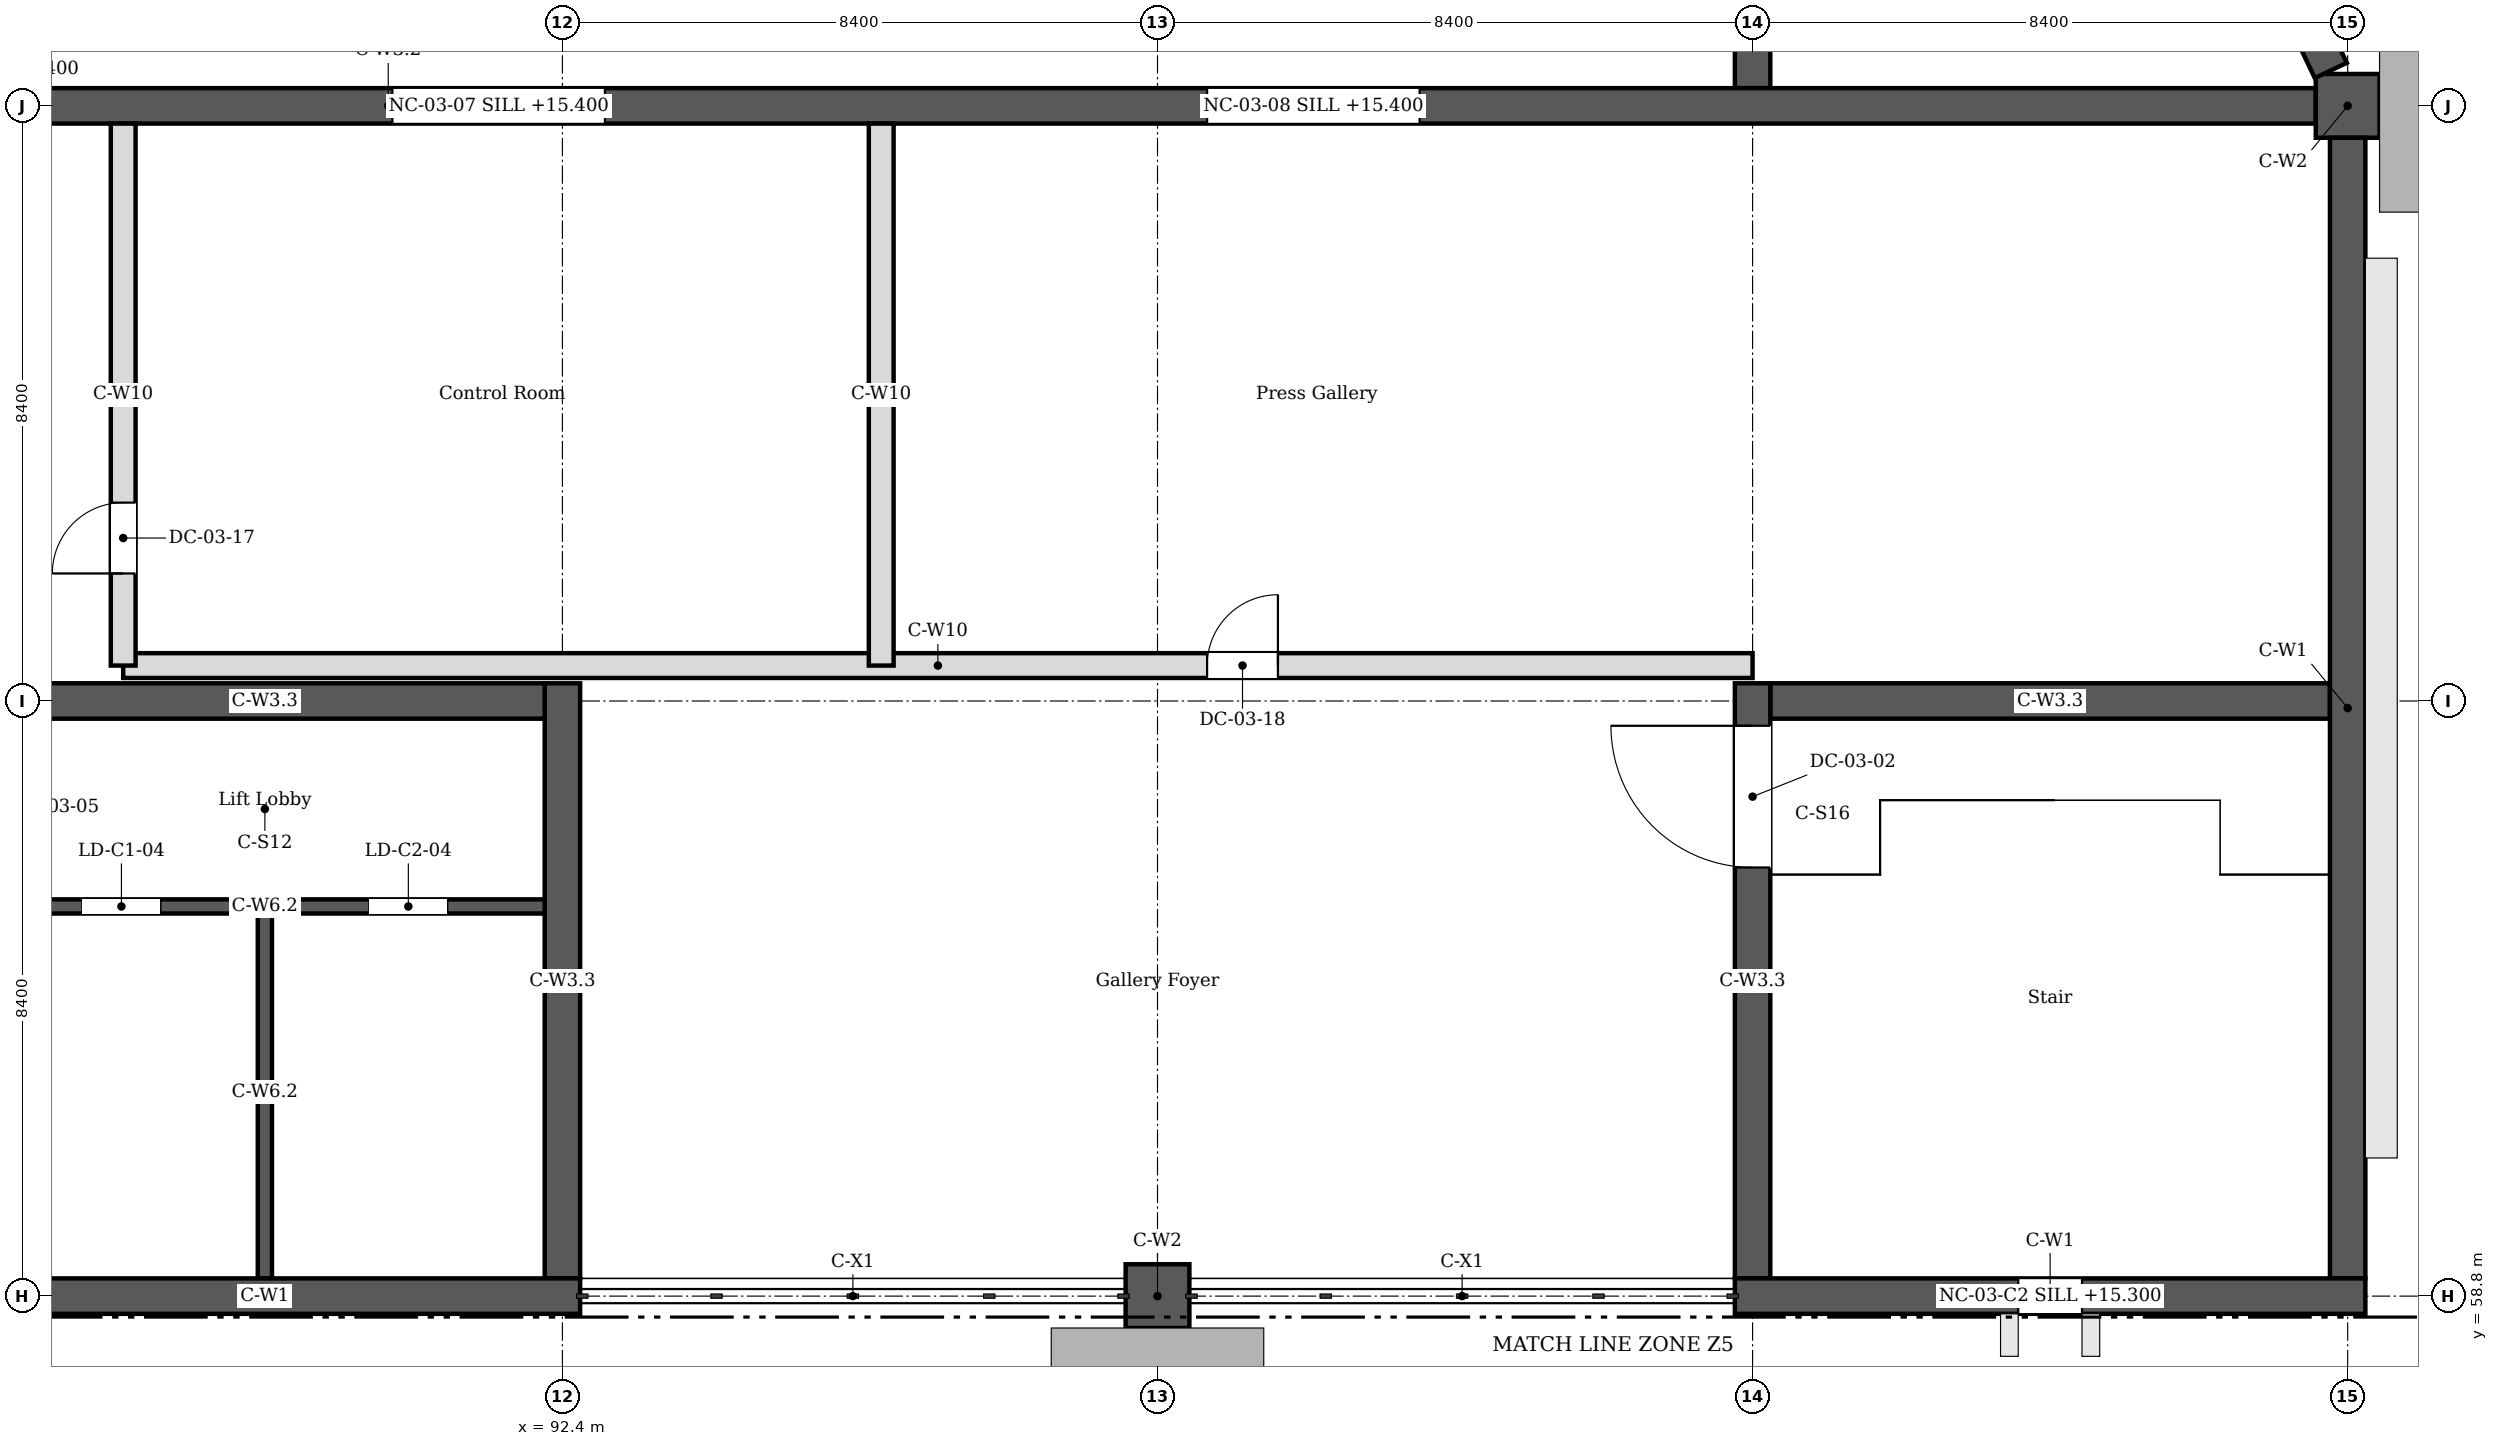
"""IFC4 building model, lengths in metres.
Left out: names, types, materials, properties, quantities, classifications, styles, units other than length and angle.
Written with IfcOpenShell. Run it as: python <this file> out.ifc"""

import sys

from ifc_helpers import new_model, si_unit, direction, frame, frame_2d, origin, place, context, subcontext, project, spatial, rectangle, extrude, element, fill, save


model = new_model("IFC4")
c1 = context("Model", 3, precision=1e-05, world=origin(), true_north=direction((0.0, 1.0)))
c2 = subcontext(c1, "Body", "Model", "MODEL_VIEW")
j1 = project(units=[si_unit("LENGTHUNIT", "METRE"), si_unit("PLANEANGLEUNIT", "RADIAN")], contexts=[c1])
p1 = place(None, origin())
s1 = spatial("IfcSite", under=j1, at=p1, CompositionType="ELEMENT")
p2 = place(p1, origin())
s2 = spatial("IfcBuilding", under=s1, at=p2, CompositionType="ELEMENT")
p3 = place(p2, frame((0.0, 0.0, 14.4)))
s3 = spatial("IfcBuildingStorey", under=s2, at=p3, CompositionType="ELEMENT", Elevation=14.4)
p4 = place(p3, frame((92.65, 58.8, 0.0), z_axis=(0.0, 0.0, 1.0), x_axis=(-1.0, 0.0, 0.0)))
e1 = element("IfcWall", 1, at=p4, inside=s3, PredefinedType="SOLIDWALL", context=c2, shape_type="SweptSolid", body=[
    extrude(rectangle(XDim=8.9, YDim=0.5, at=frame_2d((4.45, 0.0))), origin(), (0.0, 0.0, 1.0), 4.2),
])
p5 = place(p3, frame((117.85, 58.8, 0.0), z_axis=(0.0, 0.0, 1.0), x_axis=(-1.0, 0.0, 0.0)))
e2 = element("IfcWall", 2, at=p5, inside=s3, PredefinedType="SOLIDWALL", context=c2, shape_type="SweptSolid", body=[
    extrude(rectangle(XDim=8.9, YDim=0.5, at=frame_2d((4.45, 0.0))), origin(), (0.0, 0.0, 1.0), 4.2),
])
p6 = place(p5, frame((4.0, 0.0, 0.9)))
e3 = element("IfcOpeningElement", 3, at=p6, cuts=e2, PredefinedType="OPENING", context=c2, shape_type="SweptSolid", body=[
    extrude(rectangle(XDim=0.9, YDim=2.4, at=frame_2d((0.45, 1.2))), frame((0.0, 0.26, 0.0), z_axis=(0.0, -1.0, 0.0), x_axis=(1.0, 0.0, 0.0)), (0.0, 0.0, 1.0), 0.52),
])
p7 = place(p3, frame((100.35, 58.8, 0.0), z_axis=(0.0, 0.0, 1.0), x_axis=(1.0, 0.0, 0.0)))
e4 = element("IfcWall", 4, at=p7, inside=s3, PredefinedType="SOLIDWALL", context=c2, shape_type="SweptSolid", body=[
    extrude(rectangle(XDim=0.9, YDim=0.9, at=frame_2d((0.45, 0.0))), origin(), (0.0, 0.0, 1.0), 4.2),
])
p8 = place(p3, frame((117.6, 75.15, 0.0), z_axis=(0.0, 0.0, 1.0), x_axis=(0.0, -1.0, 0.0)))
e5 = element("IfcWall", 5, at=p8, inside=s3, PredefinedType="SOLIDWALL", context=c2, shape_type="SweptSolid", body=[
    extrude(rectangle(XDim=16.1, YDim=0.5, at=frame_2d((8.05, 0.0))), origin(), (0.0, 0.0, 1.0), 4.2),
])
p9 = place(p3, frame((113.666, 83.863, 0.0), z_axis=(0.0, 0.0, 1.0), x_axis=(0.429922557701, -0.902865767642, 0.0)))
e6 = element("IfcWall", 6, at=p9, inside=s3, PredefinedType="SOLIDWALL", context=c2, shape_type="SweptSolid", body=[
    extrude(rectangle(XDim=8.598, YDim=0.5, at=frame_2d((4.299, 0.0))), origin(), (0.0, 0.0, 1.0), 4.2),
])
p10 = place(p9, frame((5.012, 0.0, 0.3)))
e7 = element("IfcOpeningElement", 7, at=p10, cuts=e6, PredefinedType="OPENING", context=c2, shape_type="SweptSolid", body=[
    extrude(rectangle(XDim=1.8, YDim=3.6, at=frame_2d((0.9, 1.8))), frame((0.0, 0.26, 0.0), z_axis=(0.0, -1.0, 0.0), x_axis=(1.0, 0.0, 0.0)), (0.0, 0.0, 1.0), 0.52),
])
p11 = place(p9, frame((2.188, 0.0, 0.3)))
e8 = element("IfcOpeningElement", 8, at=p11, cuts=e6, PredefinedType="OPENING", context=c2, shape_type="SweptSolid", body=[
    extrude(rectangle(XDim=1.8, YDim=3.6, at=frame_2d((0.9, 1.8))), frame((0.0, 0.26, 0.0), z_axis=(0.0, -1.0, 0.0), x_axis=(1.0, 0.0, 0.0)), (0.0, 0.0, 1.0), 0.52),
])
p12 = place(p3, frame((117.6, 75.15, 0.0), z_axis=(0.0, 0.0, 1.0), x_axis=(0.0, 1.0, 0.0)))
e9 = element("IfcWall", 9, at=p12, inside=s3, PredefinedType="SOLIDWALL", context=c2, shape_type="SweptSolid", body=[
    extrude(rectangle(XDim=0.9, YDim=0.9, at=frame_2d((0.45, 0.0))), origin(), (0.0, 0.0, 1.0), 4.2),
])
p13 = place(p3, frame((59.25, 75.6, 0.0), z_axis=(0.0, 0.0, 1.0), x_axis=(1.0, 0.0, 0.0)))
e10 = element("IfcWall", 10, at=p13, inside=s3, PredefinedType="SOLIDWALL", context=c2, shape_type="SweptSolid", body=[
    extrude(rectangle(XDim=57.9, YDim=0.5, at=frame_2d((28.95, 0.0))), origin(), (0.0, 0.0, 1.0), 4.2),
])
p14 = place(p13, frame((10.75, 0.0, 1.0)))
e11 = element("IfcOpeningElement", 11, at=p14, cuts=e10, PredefinedType="OPENING", context=c2, shape_type="SweptSolid", body=[
    extrude(rectangle(XDim=1.6, YDim=1.2, at=frame_2d((0.8, 0.6))), frame((0.0, 0.26, 0.0), z_axis=(0.0, -1.0, 0.0), x_axis=(1.0, 0.0, 0.0)), (0.0, 0.0, 1.0), 0.52),
])
p15 = place(p13, frame((13.15, 0.0, 1.0)))
e12 = element("IfcOpeningElement", 12, at=p15, cuts=e10, PredefinedType="OPENING", context=c2, shape_type="SweptSolid", body=[
    extrude(rectangle(XDim=1.6, YDim=1.2, at=frame_2d((0.8, 0.6))), frame((0.0, 0.26, 0.0), z_axis=(0.0, -1.0, 0.0), x_axis=(1.0, 0.0, 0.0)), (0.0, 0.0, 1.0), 0.52),
])
p16 = place(p13, frame((15.55, 0.0, 1.0)))
e13 = element("IfcOpeningElement", 13, at=p16, cuts=e10, PredefinedType="OPENING", context=c2, shape_type="SweptSolid", body=[
    extrude(rectangle(XDim=1.6, YDim=1.2, at=frame_2d((0.8, 0.6))), frame((0.0, 0.26, 0.0), z_axis=(0.0, -1.0, 0.0), x_axis=(1.0, 0.0, 0.0)), (0.0, 0.0, 1.0), 0.52),
])
p17 = place(p13, frame((17.95, 0.0, 1.0)))
e14 = element("IfcOpeningElement", 14, at=p17, cuts=e10, PredefinedType="OPENING", context=c2, shape_type="SweptSolid", body=[
    extrude(rectangle(XDim=1.6, YDim=1.2, at=frame_2d((0.8, 0.6))), frame((0.0, 0.26, 0.0), z_axis=(0.0, -1.0, 0.0), x_axis=(1.0, 0.0, 0.0)), (0.0, 0.0, 1.0), 0.52),
])
p18 = place(p13, frame((20.35, 0.0, 1.0)))
e15 = element("IfcOpeningElement", 15, at=p18, cuts=e10, PredefinedType="OPENING", context=c2, shape_type="SweptSolid", body=[
    extrude(rectangle(XDim=1.6, YDim=1.2, at=frame_2d((0.8, 0.6))), frame((0.0, 0.26, 0.0), z_axis=(0.0, -1.0, 0.0), x_axis=(1.0, 0.0, 0.0)), (0.0, 0.0, 1.0), 0.52),
])
p19 = place(p13, frame((22.75, 0.0, 1.0)))
e16 = element("IfcOpeningElement", 16, at=p19, cuts=e10, PredefinedType="OPENING", context=c2, shape_type="SweptSolid", body=[
    extrude(rectangle(XDim=1.6, YDim=1.2, at=frame_2d((0.8, 0.6))), frame((0.0, 0.26, 0.0), z_axis=(0.0, -1.0, 0.0), x_axis=(1.0, 0.0, 0.0)), (0.0, 0.0, 1.0), 0.52),
])
p20 = place(p13, frame((30.75, 0.0, 1.0)))
e17 = element("IfcOpeningElement", 17, at=p20, cuts=e10, PredefinedType="OPENING", context=c2, shape_type="SweptSolid", body=[
    extrude(rectangle(XDim=3.0, YDim=1.2, at=frame_2d((1.5, 0.6))), frame((0.0, 0.26, 0.0), z_axis=(0.0, -1.0, 0.0), x_axis=(1.0, 0.0, 0.0)), (0.0, 0.0, 1.0), 0.52),
])
p21 = place(p13, frame((42.25, 0.0, 1.0)))
e18 = element("IfcOpeningElement", 18, at=p21, cuts=e10, PredefinedType="OPENING", context=c2, shape_type="SweptSolid", body=[
    extrude(rectangle(XDim=3.0, YDim=1.2, at=frame_2d((1.5, 0.6))), frame((0.0, 0.26, 0.0), z_axis=(0.0, -1.0, 0.0), x_axis=(1.0, 0.0, 0.0)), (0.0, 0.0, 1.0), 0.52),
])
p22 = place(p3, frame((109.2, 117.35, 0.0), z_axis=(0.0, 0.0, 1.0), x_axis=(0.0, -1.0, 0.0)))
e19 = element("IfcWall", 19, at=p22, inside=s3, PredefinedType="SOLIDWALL", context=c2, shape_type="SweptSolid", body=[
    extrude(rectangle(XDim=41.5, YDim=0.5, at=frame_2d((20.75, 0.0))), origin(), (0.0, 0.0, 1.0), 4.2),
])
p23 = place(p22, frame((5.8, 0.0, 0.0)))
e20 = element("IfcOpeningElement", 20, at=p23, cuts=e19, PredefinedType="OPENING", context=c2, shape_type="SweptSolid", body=[
    extrude(rectangle(XDim=2.0, YDim=2.1, at=frame_2d((1.0, 1.05))), frame((0.0, 0.26, 0.0), z_axis=(0.0, -1.0, 0.0), x_axis=(1.0, 0.0, 0.0)), (0.0, 0.0, 1.0), 0.52),
])
p24 = place(p3, frame((109.2, 59.05, 0.0), z_axis=(0.0, 0.0, 1.0), x_axis=(0.0, 1.0, 0.0)))
e21 = element("IfcWall", 21, at=p24, inside=s3, PredefinedType="SOLIDWALL", context=c2, shape_type="SweptSolid", body=[
    extrude(rectangle(XDim=8.4, YDim=0.5, at=frame_2d((4.2, 0.0))), origin(), (0.0, 0.0, 1.0), 3.8),
])
p25 = place(p24, frame((5.8, 0.0, 0.0)))
e22 = element("IfcOpeningElement", 22, at=p25, cuts=e21, PredefinedType="OPENING", context=c2, shape_type="SweptSolid", body=[
    extrude(rectangle(XDim=2.0, YDim=2.1, at=frame_2d((1.0, 1.05))), frame((0.0, 0.26, 0.0), z_axis=(0.0, -1.0, 0.0), x_axis=(1.0, 0.0, 0.0)), (0.0, 0.0, 1.0), 0.52),
])
p26 = place(p3, frame((109.45, 67.2, 0.0), z_axis=(0.0, 0.0, 1.0), x_axis=(1.0, 0.0, 0.0)))
e23 = element("IfcWall", 23, at=p26, inside=s3, PredefinedType="SOLIDWALL", context=c2, shape_type="SweptSolid", body=[
    extrude(rectangle(XDim=7.9, YDim=0.5, at=frame_2d((3.95, 0.0))), origin(), (0.0, 0.0, 1.0), 3.8),
])
p27 = place(p3, frame((92.4, 59.05, 0.0), z_axis=(0.0, 0.0, 1.0), x_axis=(0.0, 1.0, 0.0)))
e24 = element("IfcWall", 24, at=p27, inside=s3, PredefinedType="SOLIDWALL", context=c2, shape_type="SweptSolid", body=[
    extrude(rectangle(XDim=8.4, YDim=0.5, at=frame_2d((4.2, 0.0))), origin(), (0.0, 0.0, 1.0), 3.8),
])
p28 = place(p3, frame((84.25, 67.2, 0.0), z_axis=(0.0, 0.0, 1.0), x_axis=(1.0, 0.0, 0.0)))
e25 = element("IfcWall", 25, at=p28, inside=s3, PredefinedType="SOLIDWALL", context=c2, shape_type="SweptSolid", body=[
    extrude(rectangle(XDim=7.9, YDim=0.5, at=frame_2d((3.95, 0.0))), origin(), (0.0, 0.0, 1.0), 3.8),
])
p29 = place(p3, frame((88.2, 59.05, 0.0), z_axis=(0.0, 0.0, 1.0), x_axis=(0.0, 1.0, 0.0)))
e26 = element("IfcWall", 26, at=p29, inside=s3, PredefinedType="PARTITIONING", context=c2, shape_type="SweptSolid", body=[
    extrude(rectangle(XDim=5.25, YDim=0.2, at=frame_2d((2.625, 0.0))), origin(), (0.0, 0.0, 1.0), 3.8),
])
p30 = place(p3, frame((84.25, 64.3, 0.0), z_axis=(0.0, 0.0, 1.0), x_axis=(1.0, 0.0, 0.0)))
e27 = element("IfcWall", 27, at=p30, inside=s3, PredefinedType="PARTITIONING", context=c2, shape_type="SweptSolid", body=[
    extrude(rectangle(XDim=7.9, YDim=0.2, at=frame_2d((3.95, 0.0))), origin(), (0.0, 0.0, 1.0), 3.8),
])
p31 = place(p30, frame((1.375, 0.0, 0.0)))
e28 = element("IfcOpeningElement", 28, at=p31, cuts=e27, PredefinedType="OPENING", context=c2, shape_type="SweptSolid", body=[
    extrude(rectangle(XDim=1.1, YDim=2.1, at=frame_2d((0.55, 1.05))), frame((0.0, 0.11, 0.0), z_axis=(0.0, -1.0, 0.0), x_axis=(1.0, 0.0, 0.0)), (0.0, 0.0, 1.0), 0.22),
])
p32 = place(p30, frame((5.425, 0.0, 0.0)))
e29 = element("IfcOpeningElement", 29, at=p32, cuts=e27, PredefinedType="OPENING", context=c2, shape_type="SweptSolid", body=[
    extrude(rectangle(XDim=1.1, YDim=2.1, at=frame_2d((0.55, 1.05))), frame((0.0, 0.11, 0.0), z_axis=(0.0, -1.0, 0.0), x_axis=(1.0, 0.0, 0.0)), (0.0, 0.0, 1.0), 0.22),
])
p33 = place(p3, frame((86.2, 67.7, 0.0), z_axis=(0.0, 0.0, 1.0), x_axis=(0.0, 1.0, 0.0)))
e30 = element("IfcWall", 30, at=p33, inside=s3, PredefinedType="PARTITIONING", context=c2, shape_type="SweptSolid", body=[
    extrude(rectangle(XDim=7.65, YDim=0.35, at=frame_2d((3.825, 0.0))), origin(), (0.0, 0.0, 1.0), 2.85),
])
p34 = place(p33, frame((1.3, 0.0, 0.0)))
e31 = element("IfcOpeningElement", 31, at=p34, cuts=e30, PredefinedType="OPENING", context=c2, shape_type="SweptSolid", body=[
    extrude(rectangle(XDim=1.0, YDim=2.1, at=frame_2d((0.5, 1.05))), frame((0.0, 0.185, 0.0), z_axis=(0.0, -1.0, 0.0), x_axis=(1.0, 0.0, 0.0)), (0.0, 0.0, 1.0), 0.37),
])
p35 = place(p3, frame((96.9, 67.7, 0.0), z_axis=(0.0, 0.0, 1.0), x_axis=(0.0, 1.0, 0.0)))
e32 = element("IfcWall", 32, at=p35, inside=s3, PredefinedType="PARTITIONING", context=c2, shape_type="SweptSolid", body=[
    extrude(rectangle(XDim=7.65, YDim=0.35, at=frame_2d((3.825, 0.0))), origin(), (0.0, 0.0, 1.0), 2.85),
])
p36 = place(p3, frame((86.2, 67.7, 0.0), z_axis=(0.0, 0.0, 1.0), x_axis=(1.0, 0.0, 0.0)))
e33 = element("IfcWall", 33, at=p36, inside=s3, PredefinedType="PARTITIONING", context=c2, shape_type="SweptSolid", body=[
    extrude(rectangle(XDim=23.0, YDim=0.35, at=frame_2d((11.5, 0.0))), origin(), (0.0, 0.0, 1.0), 2.85),
])
p37 = place(p36, frame((15.3, 0.0, 0.0)))
e34 = element("IfcOpeningElement", 34, at=p37, cuts=e33, PredefinedType="OPENING", context=c2, shape_type="SweptSolid", body=[
    extrude(rectangle(XDim=1.0, YDim=2.1, at=frame_2d((0.5, 1.05))), frame((0.0, 0.185, 0.0), z_axis=(0.0, -1.0, 0.0), x_axis=(1.0, 0.0, 0.0)), (0.0, 0.0, 1.0), 0.37),
])
p38 = place(p6, origin())
e35 = element("IfcWindow", 35, at=p38, inside=s3, PartitioningType="SINGLE_PANEL", PredefinedType="WINDOW", context=c2, shape_type="SweptSolid", body=[
    extrude(rectangle(XDim=0.9, YDim=2.4, at=frame_2d((0.45, 1.2))), frame((0.0, 0.03, 0.0), z_axis=(0.0, -1.0, 0.0), x_axis=(1.0, 0.0, 0.0)), (0.0, 0.0, 1.0), 0.06),
])
fill(e3, e35)
p39 = place(p31, origin())
e36 = element("IfcDoor", 36, at=p39, inside=s3, OperationType="SLIDING_TO_LEFT", PredefinedType="DOOR", context=c2, shape_type="SweptSolid", body=[
    extrude(rectangle(XDim=1.1, YDim=2.1, at=frame_2d((0.55, 1.05))), frame((0.0, 0.025, 0.0), z_axis=(0.0, -1.0, 0.0), x_axis=(1.0, 0.0, 0.0)), (0.0, 0.0, 1.0), 0.05),
])
fill(e28, e36)
p40 = place(p32, origin())
e37 = element("IfcDoor", 37, at=p40, inside=s3, OperationType="SLIDING_TO_LEFT", PredefinedType="DOOR", context=c2, shape_type="SweptSolid", body=[
    extrude(rectangle(XDim=1.1, YDim=2.1, at=frame_2d((0.55, 1.05))), frame((0.0, 0.025, 0.0), z_axis=(0.0, -1.0, 0.0), x_axis=(1.0, 0.0, 0.0)), (0.0, 0.0, 1.0), 0.05),
])
fill(e29, e37)
p41 = place(p25, origin())
e38 = element("IfcDoor", 38, at=p41, inside=s3, OperationType="DOUBLE_DOOR_DOUBLE_SWING", PredefinedType="DOOR", context=c2, shape_type="SweptSolid", body=[
    extrude(rectangle(XDim=2.0, YDim=2.1, at=frame_2d((1.0, 1.05))), frame((0.0, 0.025, 0.0), z_axis=(0.0, -1.0, 0.0), x_axis=(1.0, 0.0, 0.0)), (0.0, 0.0, 1.0), 0.05),
])
fill(e22, e38)
p42 = place(p34, origin())
e39 = element("IfcDoor", 39, at=p42, inside=s3, OperationType="SINGLE_SWING_LEFT", PredefinedType="DOOR", context=c2, shape_type="SweptSolid", body=[
    extrude(rectangle(XDim=1.0, YDim=2.1, at=frame_2d((0.5, 1.05))), frame((0.0, 0.025, 0.0), z_axis=(0.0, -1.0, 0.0), x_axis=(1.0, 0.0, 0.0)), (0.0, 0.0, 1.0), 0.05),
])
fill(e31, e39)
p43 = place(p37, origin())
e40 = element("IfcDoor", 40, at=p43, inside=s3, OperationType="SINGLE_SWING_LEFT", PredefinedType="DOOR", context=c2, shape_type="SweptSolid", body=[
    extrude(rectangle(XDim=1.0, YDim=2.1, at=frame_2d((0.5, 1.05))), frame((0.0, 0.025, 0.0), z_axis=(0.0, -1.0, 0.0), x_axis=(1.0, 0.0, 0.0)), (0.0, 0.0, 1.0), 0.05),
])
fill(e34, e40)
p44 = place(p20, origin())
e41 = element("IfcWindow", 41, at=p44, inside=s3, PartitioningType="SINGLE_PANEL", PredefinedType="WINDOW", context=c2, shape_type="SweptSolid", body=[
    extrude(rectangle(XDim=3.0, YDim=1.2, at=frame_2d((1.5, 0.6))), frame((0.0, 0.03, 0.0), z_axis=(0.0, -1.0, 0.0), x_axis=(1.0, 0.0, 0.0)), (0.0, 0.0, 1.0), 0.06),
])
fill(e17, e41)
p45 = place(p21, origin())
e42 = element("IfcWindow", 42, at=p45, inside=s3, PartitioningType="SINGLE_PANEL", PredefinedType="WINDOW", context=c2, shape_type="SweptSolid", body=[
    extrude(rectangle(XDim=3.0, YDim=1.2, at=frame_2d((1.5, 0.6))), frame((0.0, 0.03, 0.0), z_axis=(0.0, -1.0, 0.0), x_axis=(1.0, 0.0, 0.0)), (0.0, 0.0, 1.0), 0.06),
])
fill(e18, e42)
save(model, sys.argv[1])
